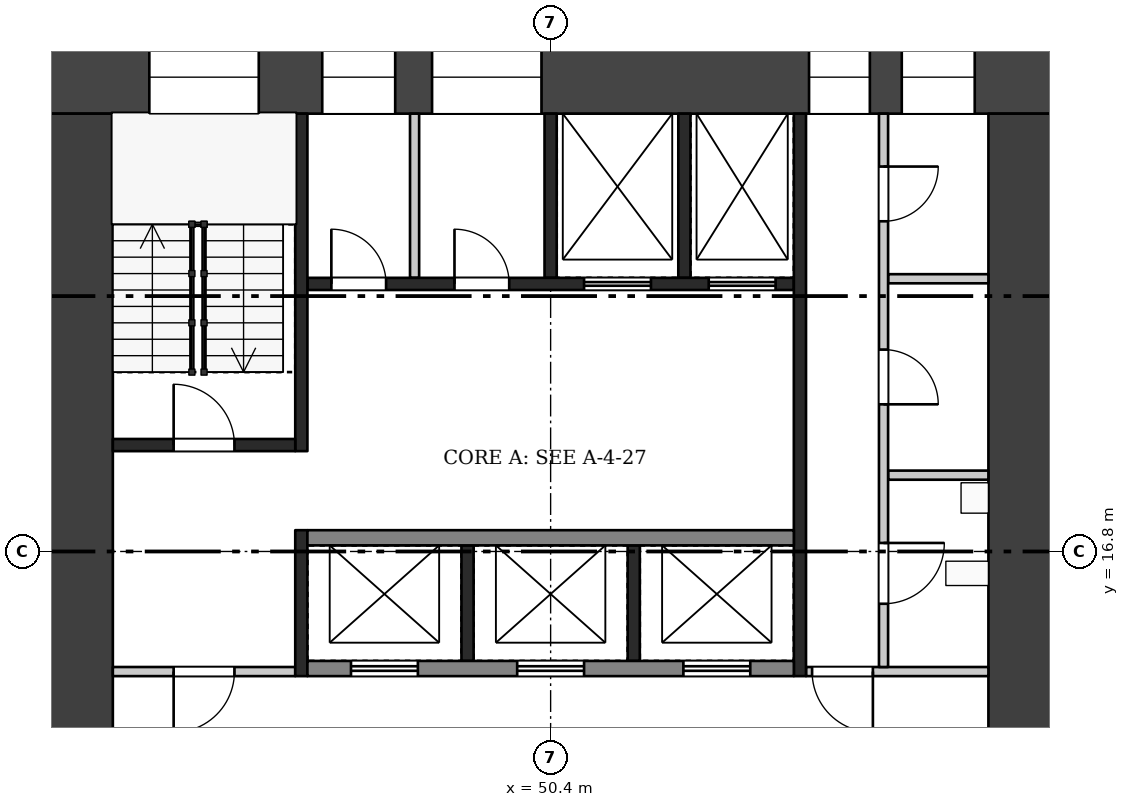
"""IFC4 building model, lengths in metres.
Left out: names, types, materials, properties, quantities, classifications, styles, units other than length and angle.
Written with IfcOpenShell. Run it as: python <this file> out.ifc"""

import sys

from ifc_helpers import new_model, si_unit, direction, frame, frame_2d, origin, place, context, subcontext, project, spatial, rectangle, extrude, element, fill, save


model = new_model("IFC4")
c1 = context("Model", 3, precision=1e-05, world=origin(), true_north=direction((0.0, 1.0)))
c2 = subcontext(c1, "Body", "Model", "MODEL_VIEW")
j1 = project(units=[si_unit("LENGTHUNIT", "METRE"), si_unit("PLANEANGLEUNIT", "RADIAN")], contexts=[c1])
p1 = place(None, origin())
s1 = spatial("IfcSite", under=j1, at=p1, CompositionType="ELEMENT")
p2 = place(p1, origin())
s2 = spatial("IfcBuilding", under=s1, at=p2, CompositionType="ELEMENT")
p3 = place(p2, frame((0.0, 0.0, 189.7)))
s3 = spatial("IfcBuildingStorey", under=s2, at=p3, CompositionType="ELEMENT", Elevation=189.7)
p4 = place(p3, frame((42.0, 24.6, 0.0), z_axis=(0.0, 0.0, 1.0), x_axis=(1.0, 0.0, 0.0)))
e1 = element("IfcWall", 1, at=p4, inside=s3, PredefinedType="SHEAR", context=c2, shape_type="SweptSolid", body=[
    extrude(rectangle(XDim=16.8, YDim=1.2, at=frame_2d((8.4, 0.0))), origin(), (0.0, 0.0, 1.0), 3.22),
])
p5 = place(p4, frame((1.8, 0.0, 0.5)))
e2 = element("IfcOpeningElement", 2, at=p5, cuts=e1, PredefinedType="OPENING", context=c2, shape_type="SweptSolid", body=[
    extrude(rectangle(XDim=1.8, YDim=2.4, at=frame_2d((0.9, 1.2))), frame((0.0, 0.61, 0.0), z_axis=(0.0, -1.0, 0.0), x_axis=(1.0, 0.0, 0.0)), (0.0, 0.0, 1.0), 1.22),
])
p6 = place(p4, frame((4.644, 0.0, 1.6)))
e3 = element("IfcOpeningElement", 3, at=p6, cuts=e1, PredefinedType="OPENING", context=c2, shape_type="SweptSolid", body=[
    extrude(rectangle(XDim=1.2, YDim=1.2, at=frame_2d((0.6, 0.6))), frame((0.0, 0.61, 0.0), z_axis=(0.0, -1.0, 0.0), x_axis=(1.0, 0.0, 0.0)), (0.0, 0.0, 1.0), 1.22),
])
p7 = place(p4, frame((6.45, 0.0, 1.6)))
e4 = element("IfcOpeningElement", 4, at=p7, cuts=e1, PredefinedType="OPENING", context=c2, shape_type="SweptSolid", body=[
    extrude(rectangle(XDim=1.8, YDim=1.2, at=frame_2d((0.9, 0.6))), frame((0.0, 0.61, 0.0), z_axis=(0.0, -1.0, 0.0), x_axis=(1.0, 0.0, 0.0)), (0.0, 0.0, 1.0), 1.22),
])
p8 = place(p4, frame((12.65, 0.0, 0.6)))
e5 = element("IfcOpeningElement", 5, at=p8, cuts=e1, PredefinedType="OPENING", context=c2, shape_type="SweptSolid", body=[
    extrude(rectangle(XDim=1.0, YDim=2.1, at=frame_2d((0.5, 1.05))), frame((0.0, 0.61, 0.0), z_axis=(0.0, -1.0, 0.0), x_axis=(1.0, 0.0, 0.0)), (0.0, 0.0, 1.0), 1.22),
])
p9 = place(p4, frame((14.175, 0.0, 1.6)))
e6 = element("IfcOpeningElement", 6, at=p9, cuts=e1, PredefinedType="OPENING", context=c2, shape_type="SweptSolid", body=[
    extrude(rectangle(XDim=1.2, YDim=1.2, at=frame_2d((0.6, 0.6))), frame((0.0, 0.61, 0.0), z_axis=(0.0, -1.0, 0.0), x_axis=(1.0, 0.0, 0.0)), (0.0, 0.0, 1.0), 1.22),
])
p10 = place(p3, frame((42.6, 9.6, 0.0), z_axis=(0.0, 0.0, 1.0), x_axis=(0.0, 1.0, 0.0)))
e7 = element("IfcWall", 7, at=p10, inside=s3, PredefinedType="SHEAR", context=c2, shape_type="SweptSolid", body=[
    extrude(rectangle(XDim=14.4, YDim=1.2, at=frame_2d((7.2, 0.0))), origin(), (0.0, 0.0, 1.0), 3.22),
])
p11 = place(p10, frame((2.1, 0.0, 0.0)))
e8 = element("IfcOpeningElement", 8, at=p11, cuts=e7, PredefinedType="OPENING", context=c2, shape_type="SweptSolid", body=[
    extrude(rectangle(XDim=1.8, YDim=2.1, at=frame_2d((0.9, 1.05))), frame((0.0, 0.61, 0.0), z_axis=(0.0, -1.0, 0.0), x_axis=(1.0, 0.0, 0.0)), (0.0, 0.0, 1.0), 1.22),
])
p12 = place(p3, frame((58.2, 9.6, 0.0), z_axis=(0.0, 0.0, 1.0), x_axis=(0.0, 1.0, 0.0)))
e9 = element("IfcWall", 9, at=p12, inside=s3, PredefinedType="SHEAR", context=c2, shape_type="SweptSolid", body=[
    extrude(rectangle(XDim=14.4, YDim=1.2, at=frame_2d((7.2, 0.0))), origin(), (0.0, 0.0, 1.0), 3.22),
])
p13 = place(p12, frame((2.1, 0.0, 0.0)))
e10 = element("IfcOpeningElement", 10, at=p13, cuts=e9, PredefinedType="OPENING", context=c2, shape_type="SweptSolid", body=[
    extrude(rectangle(XDim=1.8, YDim=2.1, at=frame_2d((0.9, 1.05))), frame((0.0, 0.61, 0.0), z_axis=(0.0, -1.0, 0.0), x_axis=(1.0, 0.0, 0.0)), (0.0, 0.0, 1.0), 1.22),
])
for number, where, z_axis, x_axis in (
    (11, (49.033, 15.0, 0.0), (0.0, 0.0, 1.0), (0.0, 1.0, 0.0)),
    (12, (51.767, 15.0, 0.0), (0.0, 0.0, 1.0), (0.0, 1.0, 0.0)),
):
    element("IfcWall", number, at=place(p3, frame(where, z_axis=z_axis, x_axis=x_axis)), inside=s3, PredefinedType="SHEAR", context=c2, shape_type="SweptSolid", body=[
        extrude(rectangle(XDim=1.9, YDim=0.2, at=frame_2d((0.95, 0.0))), origin(), (0.0, 0.0, 1.0), 3.22),
    ])
p14 = place(p3, frame((46.4, 14.875, 0.0), z_axis=(0.0, 0.0, 1.0), x_axis=(1.0, 0.0, 0.0)))
e13 = element("IfcWall", 13, at=p14, inside=s3, PredefinedType="SHEAR", context=c2, shape_type="SweptSolid", body=[
    extrude(rectangle(XDim=8.0, YDim=0.25, at=frame_2d((4.0, 0.0))), origin(), (0.0, 0.0, 1.0), 3.22),
])
p15 = place(p14, frame((0.717, 0.0, 0.0)))
e14 = element("IfcOpeningElement", 14, at=p15, cuts=e13, PredefinedType="OPENING", context=c2, shape_type="SweptSolid", body=[
    extrude(rectangle(XDim=1.1, YDim=2.1, at=frame_2d((0.55, 1.05))), frame((0.0, 0.135, 0.0), z_axis=(0.0, -1.0, 0.0), x_axis=(1.0, 0.0, 0.0)), (0.0, 0.0, 1.0), 0.27),
])
p16 = place(p14, frame((3.45, 0.0, 0.0)))
e15 = element("IfcOpeningElement", 15, at=p16, cuts=e13, PredefinedType="OPENING", context=c2, shape_type="SweptSolid", body=[
    extrude(rectangle(XDim=1.1, YDim=2.1, at=frame_2d((0.55, 1.05))), frame((0.0, 0.135, 0.0), z_axis=(0.0, -1.0, 0.0), x_axis=(1.0, 0.0, 0.0)), (0.0, 0.0, 1.0), 0.27),
])
p17 = place(p14, frame((6.183, 0.0, 0.0)))
e16 = element("IfcOpeningElement", 16, at=p17, cuts=e13, PredefinedType="OPENING", context=c2, shape_type="SweptSolid", body=[
    extrude(rectangle(XDim=1.1, YDim=2.1, at=frame_2d((0.55, 1.05))), frame((0.0, 0.135, 0.0), z_axis=(0.0, -1.0, 0.0), x_axis=(1.0, 0.0, 0.0)), (0.0, 0.0, 1.0), 0.27),
])
p18 = place(p3, frame((46.4, 17.025, 0.0), z_axis=(0.0, 0.0, 1.0), x_axis=(1.0, 0.0, 0.0)))
e17 = element("IfcWall", 17, at=p18, inside=s3, PredefinedType="SHEAR", context=c2, shape_type="SweptSolid", body=[
    extrude(rectangle(XDim=8.0, YDim=0.25, at=frame_2d((4.0, 0.0))), origin(), (0.0, 0.0, 1.0), 3.22),
])
for number, where, z_axis, x_axis in (
    (18, (50.4, 21.3, 0.0), (0.0, 0.0, 1.0), (0.0, 1.0, 0.0)),
    (19, (52.6, 21.3, 0.0), (0.0, 0.0, 1.0), (0.0, 1.0, 0.0)),
):
    element("IfcWall", number, at=place(p3, frame(where, z_axis=z_axis, x_axis=x_axis)), inside=s3, PredefinedType="SHEAR", context=c2, shape_type="SweptSolid", body=[
        extrude(rectangle(XDim=2.7, YDim=0.2, at=frame_2d((1.35, 0.0))), origin(), (0.0, 0.0, 1.0), 3.22),
    ])
p19 = place(p3, frame((48.163, 21.3, 0.0), z_axis=(0.0, 0.0, 1.0), x_axis=(0.0, 1.0, 0.0)))
e20 = element("IfcWall", 20, at=p19, inside=s3, PredefinedType="PARTITIONING", context=c2, shape_type="SweptSolid", body=[
    extrude(rectangle(XDim=2.7, YDim=0.15, at=frame_2d((1.35, 0.0))), origin(), (0.0, 0.0, 1.0), 3.22),
])
p20 = place(p3, frame((46.4, 21.2, 0.0), z_axis=(0.0, 0.0, 1.0), x_axis=(1.0, 0.0, 0.0)))
e21 = element("IfcWall", 21, at=p20, inside=s3, PredefinedType="SHEAR", context=c2, shape_type="SweptSolid", body=[
    extrude(rectangle(XDim=8.0, YDim=0.2, at=frame_2d((4.0, 0.0))), origin(), (0.0, 0.0, 1.0), 3.22),
])
p21 = place(p20, frame((0.394, 0.0, 0.0)))
e22 = element("IfcOpeningElement", 22, at=p21, cuts=e21, PredefinedType="OPENING", context=c2, shape_type="SweptSolid", body=[
    extrude(rectangle(XDim=0.9, YDim=2.1, at=frame_2d((0.45, 1.05))), frame((0.0, 0.11, 0.0), z_axis=(0.0, -1.0, 0.0), x_axis=(1.0, 0.0, 0.0)), (0.0, 0.0, 1.0), 0.22),
])
p22 = place(p20, frame((2.419, 0.0, 0.0)))
e23 = element("IfcOpeningElement", 23, at=p22, cuts=e21, PredefinedType="OPENING", context=c2, shape_type="SweptSolid", body=[
    extrude(rectangle(XDim=0.9, YDim=2.1, at=frame_2d((0.45, 1.05))), frame((0.0, 0.11, 0.0), z_axis=(0.0, -1.0, 0.0), x_axis=(1.0, 0.0, 0.0)), (0.0, 0.0, 1.0), 0.22),
])
p23 = place(p20, frame((4.55, 0.0, 0.0)))
e24 = element("IfcOpeningElement", 24, at=p23, cuts=e21, PredefinedType="OPENING", context=c2, shape_type="SweptSolid", body=[
    extrude(rectangle(XDim=1.1, YDim=2.1, at=frame_2d((0.55, 1.05))), frame((0.0, 0.11, 0.0), z_axis=(0.0, -1.0, 0.0), x_axis=(1.0, 0.0, 0.0)), (0.0, 0.0, 1.0), 0.22),
])
p24 = place(p20, frame((6.6, 0.0, 0.0)))
e25 = element("IfcOpeningElement", 25, at=p24, cuts=e21, PredefinedType="OPENING", context=c2, shape_type="SweptSolid", body=[
    extrude(rectangle(XDim=1.1, YDim=2.1, at=frame_2d((0.55, 1.05))), frame((0.0, 0.11, 0.0), z_axis=(0.0, -1.0, 0.0), x_axis=(1.0, 0.0, 0.0)), (0.0, 0.0, 1.0), 0.22),
])
p25 = place(p3, frame((46.3, 14.75, 0.0), z_axis=(0.0, 0.0, 1.0), x_axis=(0.0, 1.0, 0.0)))
e26 = element("IfcWall", 26, at=p25, inside=s3, PredefinedType="SHEAR", context=c2, shape_type="SweptSolid", body=[
    extrude(rectangle(XDim=2.4, YDim=0.2, at=frame_2d((1.2, 0.0))), origin(), (0.0, 0.0, 1.0), 3.22),
])
p26 = place(p3, frame((46.3, 18.45, 0.0), z_axis=(0.0, 0.0, 1.0), x_axis=(0.0, 1.0, 0.0)))
e27 = element("IfcWall", 27, at=p26, inside=s3, PredefinedType="SHEAR", context=c2, shape_type="SweptSolid", body=[
    extrude(rectangle(XDim=5.55, YDim=0.2, at=frame_2d((2.775, 0.0))), origin(), (0.0, 0.0, 1.0), 3.22),
])
p27 = place(p3, frame((43.2, 14.825, 0.0), z_axis=(0.0, 0.0, 1.0), x_axis=(1.0, 0.0, 0.0)))
e28 = element("IfcWall", 28, at=p27, inside=s3, PredefinedType="PARTITIONING", context=c2, shape_type="SweptSolid", body=[
    extrude(rectangle(XDim=3.0, YDim=0.15, at=frame_2d((1.5, 0.0))), origin(), (0.0, 0.0, 1.0), 3.22),
])
p28 = place(p27, frame((1.0, 0.0, 0.0)))
e29 = element("IfcOpeningElement", 29, at=p28, cuts=e28, PredefinedType="OPENING", context=c2, shape_type="SweptSolid", body=[
    extrude(rectangle(XDim=1.0, YDim=2.1, at=frame_2d((0.5, 1.05))), frame((0.0, 0.085, 0.0), z_axis=(0.0, -1.0, 0.0), x_axis=(1.0, 0.0, 0.0)), (0.0, 0.0, 1.0), 0.17),
])
p29 = place(p3, frame((43.2, 18.55, 0.0), z_axis=(0.0, 0.0, 1.0), x_axis=(1.0, 0.0, 0.0)))
e30 = element("IfcWall", 30, at=p29, inside=s3, PredefinedType="SHEAR", context=c2, shape_type="SweptSolid", body=[
    extrude(rectangle(XDim=3.0, YDim=0.2, at=frame_2d((1.5, 0.0))), origin(), (0.0, 0.0, 1.0), 3.22),
])
p30 = place(p29, frame((1.0, 0.0, 0.0)))
e31 = element("IfcOpeningElement", 31, at=p30, cuts=e30, PredefinedType="OPENING", context=c2, shape_type="SweptSolid", body=[
    extrude(rectangle(XDim=1.0, YDim=2.1, at=frame_2d((0.5, 1.05))), frame((0.0, 0.11, 0.0), z_axis=(0.0, -1.0, 0.0), x_axis=(1.0, 0.0, 0.0)), (0.0, 0.0, 1.0), 0.22),
])
p31 = place(p3, frame((54.5, 14.75, 0.0), z_axis=(0.0, 0.0, 1.0), x_axis=(0.0, 1.0, 0.0)))
e32 = element("IfcWall", 32, at=p31, inside=s3, PredefinedType="SHEAR", context=c2, shape_type="SweptSolid", body=[
    extrude(rectangle(XDim=9.25, YDim=0.2, at=frame_2d((4.625, 0.0))), origin(), (0.0, 0.0, 1.0), 3.22),
])
p32 = place(p3, frame((54.6, 14.825, 0.0), z_axis=(0.0, 0.0, 1.0), x_axis=(1.0, 0.0, 0.0)))
e33 = element("IfcWall", 33, at=p32, inside=s3, PredefinedType="PARTITIONING", context=c2, shape_type="SweptSolid", body=[
    extrude(rectangle(XDim=3.0, YDim=0.15, at=frame_2d((1.5, 0.0))), origin(), (0.0, 0.0, 1.0), 3.22),
])
p33 = place(p32, frame((0.1, 0.0, 0.0)))
e34 = element("IfcOpeningElement", 34, at=p33, cuts=e33, PredefinedType="OPENING", context=c2, shape_type="SweptSolid", body=[
    extrude(rectangle(XDim=1.0, YDim=2.1, at=frame_2d((0.5, 1.05))), frame((0.0, 0.085, 0.0), z_axis=(0.0, -1.0, 0.0), x_axis=(1.0, 0.0, 0.0)), (0.0, 0.0, 1.0), 0.17),
])
for number, where, z_axis, x_axis in (
    (35, (55.95, 18.055, 0.0), (0.0, 0.0, 1.0), (1.0, 0.0, 0.0)),
    (36, (55.95, 21.285, 0.0), (0.0, 0.0, 1.0), (1.0, 0.0, 0.0)),
):
    element("IfcWall", number, at=place(p3, frame(where, z_axis=z_axis, x_axis=x_axis)), inside=s3, PredefinedType="PARTITIONING", context=c2, shape_type="SweptSolid", body=[
        extrude(rectangle(XDim=1.65, YDim=0.15, at=frame_2d((0.825, 0.0))), origin(), (0.0, 0.0, 1.0), 3.22),
    ])
p34 = place(p3, frame((55.875, 14.9, 0.0), z_axis=(0.0, 0.0, 1.0), x_axis=(0.0, 1.0, 0.0)))
e37 = element("IfcWall", 37, at=p34, inside=s3, PredefinedType="PARTITIONING", context=c2, shape_type="SweptSolid", body=[
    extrude(rectangle(XDim=9.1, YDim=0.15, at=frame_2d((4.55, 0.0))), origin(), (0.0, 0.0, 1.0), 3.22),
])
p35 = place(p34, frame((1.04, 0.0, 0.0)))
e38 = element("IfcOpeningElement", 38, at=p35, cuts=e37, PredefinedType="OPENING", context=c2, shape_type="SweptSolid", body=[
    extrude(rectangle(XDim=1.0, YDim=2.1, at=frame_2d((0.5, 1.05))), frame((0.0, 0.085, 0.0), z_axis=(0.0, -1.0, 0.0), x_axis=(1.0, 0.0, 0.0)), (0.0, 0.0, 1.0), 0.17),
])
p36 = place(p34, frame((4.32, 0.0, 0.0)))
e39 = element("IfcOpeningElement", 39, at=p36, cuts=e37, PredefinedType="OPENING", context=c2, shape_type="SweptSolid", body=[
    extrude(rectangle(XDim=0.9, YDim=2.1, at=frame_2d((0.45, 1.05))), frame((0.0, 0.085, 0.0), z_axis=(0.0, -1.0, 0.0), x_axis=(1.0, 0.0, 0.0)), (0.0, 0.0, 1.0), 0.17),
])
p37 = place(p34, frame((7.33, 0.0, 0.0)))
e40 = element("IfcOpeningElement", 40, at=p37, cuts=e37, PredefinedType="OPENING", context=c2, shape_type="SweptSolid", body=[
    extrude(rectangle(XDim=0.9, YDim=2.1, at=frame_2d((0.45, 1.05))), frame((0.0, 0.085, 0.0), z_axis=(0.0, -1.0, 0.0), x_axis=(1.0, 0.0, 0.0)), (0.0, 0.0, 1.0), 0.17),
])
p38 = place(p15, origin())
e41 = element("IfcDoor", 41, at=p38, inside=s3, OperationType="DOUBLE_DOOR_SLIDING", PredefinedType="DOOR", context=c2, shape_type="SweptSolid", body=[
    extrude(rectangle(XDim=1.1, YDim=2.1, at=frame_2d((0.55, 1.05))), frame((0.0, 0.025, 0.0), z_axis=(0.0, -1.0, 0.0), x_axis=(1.0, 0.0, 0.0)), (0.0, 0.0, 1.0), 0.05),
])
fill(e14, e41)
p39 = place(p16, origin())
e42 = element("IfcDoor", 42, at=p39, inside=s3, OperationType="DOUBLE_DOOR_SLIDING", PredefinedType="DOOR", context=c2, shape_type="SweptSolid", body=[
    extrude(rectangle(XDim=1.1, YDim=2.1, at=frame_2d((0.55, 1.05))), frame((0.0, 0.025, 0.0), z_axis=(0.0, -1.0, 0.0), x_axis=(1.0, 0.0, 0.0)), (0.0, 0.0, 1.0), 0.05),
])
fill(e15, e42)
p40 = place(p17, origin())
e43 = element("IfcDoor", 43, at=p40, inside=s3, OperationType="DOUBLE_DOOR_SLIDING", PredefinedType="DOOR", context=c2, shape_type="SweptSolid", body=[
    extrude(rectangle(XDim=1.1, YDim=2.1, at=frame_2d((0.55, 1.05))), frame((0.0, 0.025, 0.0), z_axis=(0.0, -1.0, 0.0), x_axis=(1.0, 0.0, 0.0)), (0.0, 0.0, 1.0), 0.05),
])
fill(e16, e43)
p41 = place(p21, origin())
e44 = element("IfcDoor", 44, at=p41, inside=s3, OperationType="SINGLE_SWING_LEFT", PredefinedType="DOOR", context=c2, shape_type="SweptSolid", body=[
    extrude(rectangle(XDim=0.9, YDim=2.1, at=frame_2d((0.45, 1.05))), frame((0.0, 0.025, 0.0), z_axis=(0.0, -1.0, 0.0), x_axis=(1.0, 0.0, 0.0)), (0.0, 0.0, 1.0), 0.05),
])
fill(e22, e44)
p42 = place(p22, origin())
e45 = element("IfcDoor", 45, at=p42, inside=s3, OperationType="SINGLE_SWING_LEFT", PredefinedType="DOOR", context=c2, shape_type="SweptSolid", body=[
    extrude(rectangle(XDim=0.9, YDim=2.1, at=frame_2d((0.45, 1.05))), frame((0.0, 0.025, 0.0), z_axis=(0.0, -1.0, 0.0), x_axis=(1.0, 0.0, 0.0)), (0.0, 0.0, 1.0), 0.05),
])
fill(e23, e45)
p43 = place(p23, origin())
e46 = element("IfcDoor", 46, at=p43, inside=s3, OperationType="DOUBLE_DOOR_SLIDING", PredefinedType="DOOR", context=c2, shape_type="SweptSolid", body=[
    extrude(rectangle(XDim=1.1, YDim=2.1, at=frame_2d((0.55, 1.05))), frame((0.0, 0.025, 0.0), z_axis=(0.0, -1.0, 0.0), x_axis=(1.0, 0.0, 0.0)), (0.0, 0.0, 1.0), 0.05),
])
fill(e24, e46)
p44 = place(p24, origin())
e47 = element("IfcDoor", 47, at=p44, inside=s3, OperationType="DOUBLE_DOOR_SLIDING", PredefinedType="DOOR", context=c2, shape_type="SweptSolid", body=[
    extrude(rectangle(XDim=1.1, YDim=2.1, at=frame_2d((0.55, 1.05))), frame((0.0, 0.025, 0.0), z_axis=(0.0, -1.0, 0.0), x_axis=(1.0, 0.0, 0.0)), (0.0, 0.0, 1.0), 0.05),
])
fill(e25, e47)
p45 = place(p28, frame((1.0, 0.0, 0.0), z_axis=(0.0, 0.0, 1.0), x_axis=(-1.0, 0.0, 0.0)))
e48 = element("IfcDoor", 48, at=p45, inside=s3, OperationType="SINGLE_SWING_RIGHT", PredefinedType="DOOR", context=c2, shape_type="SweptSolid", body=[
    extrude(rectangle(XDim=1.0, YDim=2.1, at=frame_2d((0.5, 1.05))), frame((0.0, 0.025, 0.0), z_axis=(0.0, -1.0, 0.0), x_axis=(1.0, 0.0, 0.0)), (0.0, 0.0, 1.0), 0.05),
])
fill(e29, e48)
p46 = place(p30, origin())
e49 = element("IfcDoor", 49, at=p46, inside=s3, OperationType="SINGLE_SWING_LEFT", PredefinedType="DOOR", context=c2, shape_type="SweptSolid", body=[
    extrude(rectangle(XDim=1.0, YDim=2.1, at=frame_2d((0.5, 1.05))), frame((0.0, 0.025, 0.0), z_axis=(0.0, -1.0, 0.0), x_axis=(1.0, 0.0, 0.0)), (0.0, 0.0, 1.0), 0.05),
])
fill(e31, e49)
p47 = place(p33, frame((1.0, 0.0, 0.0), z_axis=(0.0, 0.0, 1.0), x_axis=(-1.0, 0.0, 0.0)))
e50 = element("IfcDoor", 50, at=p47, inside=s3, OperationType="SINGLE_SWING_LEFT", PredefinedType="DOOR", context=c2, shape_type="SweptSolid", body=[
    extrude(rectangle(XDim=1.0, YDim=2.1, at=frame_2d((0.5, 1.05))), frame((0.0, 0.025, 0.0), z_axis=(0.0, -1.0, 0.0), x_axis=(1.0, 0.0, 0.0)), (0.0, 0.0, 1.0), 0.05),
])
fill(e34, e50)
p48 = place(p35, frame((1.0, 0.0, 0.0), z_axis=(0.0, 0.0, 1.0), x_axis=(-1.0, 0.0, 0.0)))
e51 = element("IfcDoor", 51, at=p48, inside=s3, OperationType="SINGLE_SWING_LEFT", PredefinedType="DOOR", context=c2, shape_type="SweptSolid", body=[
    extrude(rectangle(XDim=1.0, YDim=2.1, at=frame_2d((0.5, 1.05))), frame((0.0, 0.025, 0.0), z_axis=(0.0, -1.0, 0.0), x_axis=(1.0, 0.0, 0.0)), (0.0, 0.0, 1.0), 0.05),
])
fill(e38, e51)
p49 = place(p36, frame((0.9, 0.0, 0.0), z_axis=(0.0, 0.0, 1.0), x_axis=(-1.0, 0.0, 0.0)))
e52 = element("IfcDoor", 52, at=p49, inside=s3, OperationType="SINGLE_SWING_RIGHT", PredefinedType="DOOR", context=c2, shape_type="SweptSolid", body=[
    extrude(rectangle(XDim=0.9, YDim=2.1, at=frame_2d((0.45, 1.05))), frame((0.0, 0.025, 0.0), z_axis=(0.0, -1.0, 0.0), x_axis=(1.0, 0.0, 0.0)), (0.0, 0.0, 1.0), 0.05),
])
fill(e39, e52)
p50 = place(p37, frame((0.9, 0.0, 0.0), z_axis=(0.0, 0.0, 1.0), x_axis=(-1.0, 0.0, 0.0)))
e53 = element("IfcDoor", 53, at=p50, inside=s3, OperationType="SINGLE_SWING_LEFT", PredefinedType="DOOR", context=c2, shape_type="SweptSolid", body=[
    extrude(rectangle(XDim=0.9, YDim=2.1, at=frame_2d((0.45, 1.05))), frame((0.0, 0.025, 0.0), z_axis=(0.0, -1.0, 0.0), x_axis=(1.0, 0.0, 0.0)), (0.0, 0.0, 1.0), 0.05),
])
fill(e40, e53)
p51 = place(p5, origin())
e54 = element("IfcWindow", 54, at=p51, inside=s3, PartitioningType="SINGLE_PANEL", PredefinedType="WINDOW", context=c2, shape_type="SweptSolid", body=[
    extrude(rectangle(XDim=1.8, YDim=2.4, at=frame_2d((0.9, 1.2))), frame((0.0, 0.03, 0.0), z_axis=(0.0, -1.0, 0.0), x_axis=(1.0, 0.0, 0.0)), (0.0, 0.0, 1.0), 0.06),
])
fill(e2, e54)
p52 = place(p6, origin())
e55 = element("IfcWindow", 55, at=p52, inside=s3, PartitioningType="SINGLE_PANEL", PredefinedType="WINDOW", context=c2, shape_type="SweptSolid", body=[
    extrude(rectangle(XDim=1.2, YDim=1.2, at=frame_2d((0.6, 0.6))), frame((0.0, 0.03, 0.0), z_axis=(0.0, -1.0, 0.0), x_axis=(1.0, 0.0, 0.0)), (0.0, 0.0, 1.0), 0.06),
])
fill(e3, e55)
p53 = place(p7, origin())
e56 = element("IfcWindow", 56, at=p53, inside=s3, PartitioningType="SINGLE_PANEL", PredefinedType="WINDOW", context=c2, shape_type="SweptSolid", body=[
    extrude(rectangle(XDim=1.8, YDim=1.2, at=frame_2d((0.9, 0.6))), frame((0.0, 0.03, 0.0), z_axis=(0.0, -1.0, 0.0), x_axis=(1.0, 0.0, 0.0)), (0.0, 0.0, 1.0), 0.06),
])
fill(e4, e56)
p54 = place(p8, origin())
e57 = element("IfcWindow", 57, at=p54, inside=s3, PartitioningType="SINGLE_PANEL", PredefinedType="WINDOW", context=c2, shape_type="SweptSolid", body=[
    extrude(rectangle(XDim=1.0, YDim=2.1, at=frame_2d((0.5, 1.05))), frame((0.0, 0.03, 0.0), z_axis=(0.0, -1.0, 0.0), x_axis=(1.0, 0.0, 0.0)), (0.0, 0.0, 1.0), 0.06),
])
fill(e5, e57)
p55 = place(p9, origin())
e58 = element("IfcWindow", 58, at=p55, inside=s3, PartitioningType="SINGLE_PANEL", PredefinedType="WINDOW", context=c2, shape_type="SweptSolid", body=[
    extrude(rectangle(XDim=1.2, YDim=1.2, at=frame_2d((0.6, 0.6))), frame((0.0, 0.03, 0.0), z_axis=(0.0, -1.0, 0.0), x_axis=(1.0, 0.0, 0.0)), (0.0, 0.0, 1.0), 0.06),
])
fill(e6, e58)
save(model, sys.argv[1])
